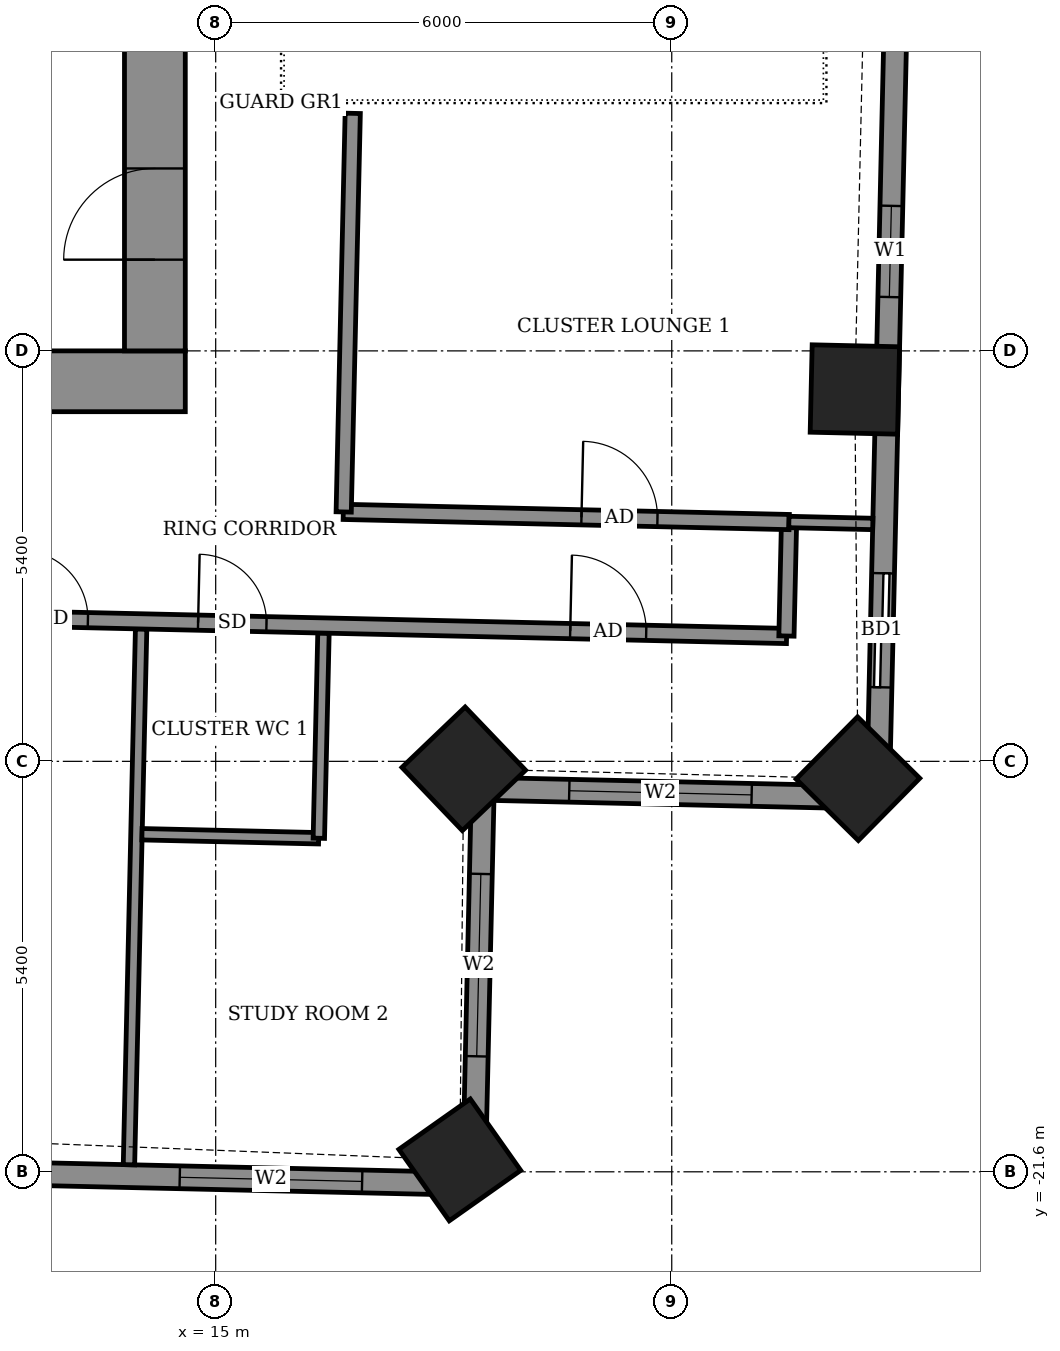
"""IFC4 building model, lengths in metres.
Left out: names, types, materials, properties, quantities, classifications, styles, units other than length and angle.
Written with IfcOpenShell. Run it as: python <this file> out.ifc"""

import sys

from ifc_helpers import new_model, si_unit, direction, frame, frame_2d, origin, origin_2d, place, context, subcontext, project, spatial, rectangle, extrude, element, fill, save


model = new_model("IFC4")
c1 = context("Model", 3, precision=1e-05, world=origin(), true_north=direction((0.0, 1.0)))
c2 = subcontext(c1, "Body", "Model", "MODEL_VIEW")
j1 = project(units=[si_unit("LENGTHUNIT", "METRE"), si_unit("PLANEANGLEUNIT", "RADIAN")], contexts=[c1])
p1 = place(None, origin())
s1 = spatial("IfcSite", under=j1, at=p1, CompositionType="ELEMENT")
p2 = place(p1, origin())
s2 = spatial("IfcBuilding", under=s1, at=p2, CompositionType="ELEMENT")
p3 = place(p2, frame((0.0, 0.0, 205.1)))
s3 = spatial("IfcBuildingStorey", under=s2, at=p3, CompositionType="ELEMENT", Elevation=205.1)
for number, where, z_axis, x_axis in (
    (1, (18.211, -21.443, -0.55), (0.0, 0.0, 1.0), (0.817, 0.577, 0.0)),
    (2, (18.264, -16.298, -0.55), (0.0, 0.0, 1.0), (0.723, 0.691, 0.0)),
    (3, (23.45, -16.428, -0.55), (0.0, 0.0, 1.0), (0.702, 0.712, 0.0)),
    (4, (23.409, -11.308, -0.55), (0.0, 0.0, 1.0), (0.023, 1.0, 0.0)),
):
    element("IfcColumn", number, at=place(p3, frame(where, z_axis=z_axis, x_axis=x_axis)), inside=s3, PredefinedType="COLUMN", context=c2, shape_type="SweptSolid", body=[
        extrude(rectangle(XDim=1.15, YDim=1.15, at=origin_2d()), origin(), (0.0, 0.0, 1.0), 3.6),
    ])
p4 = place(p3, frame((23.713, -16.679, 0.0), z_axis=(0.0, 0.0, 1.0), x_axis=(0.022674801414, 0.999742893639, 0.0)))
e5 = element("IfcWall", 5, at=p4, inside=s3, PredefinedType="SOLIDWALL", context=c2, shape_type="SweptSolid", body=[
    extrude(rectangle(XDim=11.424, YDim=0.3, at=frame_2d((5.712, 0.0))), origin(), (0.0, 0.0, 1.0), 2.55),
])
p5 = place(p4, frame((1.454, 0.0, 0.0)))
e6 = element("IfcOpeningElement", 6, at=p5, cuts=e5, PredefinedType="OPENING", context=c2, shape_type="SweptSolid", body=[
    extrude(rectangle(XDim=1.5, YDim=2.4, at=frame_2d((0.75, 1.2))), frame((0.0, 0.16, 0.0), z_axis=(0.0, -1.0, 0.0), x_axis=(1.0, 0.0, 0.0)), (0.0, 0.0, 1.0), 0.32),
])
p6 = place(p4, frame((6.589, 0.0, 0.9)))
e7 = element("IfcOpeningElement", 7, at=p6, cuts=e5, PredefinedType="OPENING", context=c2, shape_type="SweptSolid", body=[
    extrude(rectangle(XDim=1.2, YDim=1.5, at=frame_2d((0.6, 0.75))), frame((0.0, 0.16, 0.0), z_axis=(0.0, -1.0, 0.0), x_axis=(1.0, 0.0, 0.0)), (0.0, 0.0, 1.0), 0.32),
])
p7 = place(p3, frame((-23.437, -20.81, 0.0), z_axis=(0.0, 0.0, 1.0), x_axis=(0.999742269115, -0.022702320244, 0.0)))
e8 = element("IfcWall", 8, at=p7, inside=s3, PredefinedType="SOLIDWALL", context=c2, shape_type="SweptSolid", body=[
    extrude(rectangle(XDim=41.844, YDim=0.3, at=frame_2d((20.922, 0.0))), origin(), (0.0, 0.0, 1.0), 2.55),
])
p8 = place(p7, frame((1.899, 0.0, 0.0)))
e9 = element("IfcOpeningElement", 9, at=p8, cuts=e8, PredefinedType="OPENING", context=c2, shape_type="SweptSolid", body=[
    extrude(rectangle(XDim=1.5, YDim=2.4, at=frame_2d((0.75, 1.2))), frame((0.0, 0.16, 0.0), z_axis=(0.0, -1.0, 0.0), x_axis=(1.0, 0.0, 0.0)), (0.0, 0.0, 1.0), 0.32),
])
p9 = place(p7, frame((7.575, 0.0, 0.0)))
e10 = element("IfcOpeningElement", 10, at=p9, cuts=e8, PredefinedType="OPENING", context=c2, shape_type="SweptSolid", body=[
    extrude(rectangle(XDim=1.2, YDim=2.4, at=frame_2d((0.6, 1.2))), frame((0.0, 0.16, 0.0), z_axis=(0.0, -1.0, 0.0), x_axis=(1.0, 0.0, 0.0)), (0.0, 0.0, 1.0), 0.32),
])
p10 = place(p7, frame((10.612, 0.0, 0.0)))
e11 = element("IfcOpeningElement", 11, at=p10, cuts=e8, PredefinedType="OPENING", context=c2, shape_type="SweptSolid", body=[
    extrude(rectangle(XDim=1.5, YDim=2.4, at=frame_2d((0.75, 1.2))), frame((0.0, 0.16, 0.0), z_axis=(0.0, -1.0, 0.0), x_axis=(1.0, 0.0, 0.0)), (0.0, 0.0, 1.0), 0.32),
])
p11 = place(p7, frame((15.762, 0.0, 0.0)))
e12 = element("IfcOpeningElement", 12, at=p11, cuts=e8, PredefinedType="OPENING", context=c2, shape_type="SweptSolid", body=[
    extrude(rectangle(XDim=1.5, YDim=2.4, at=frame_2d((0.75, 1.2))), frame((0.0, 0.16, 0.0), z_axis=(0.0, -1.0, 0.0), x_axis=(1.0, 0.0, 0.0)), (0.0, 0.0, 1.0), 0.32),
])
p12 = place(p7, frame((21.648, 0.0, 0.0)))
e13 = element("IfcOpeningElement", 13, at=p12, cuts=e8, PredefinedType="OPENING", context=c2, shape_type="SweptSolid", body=[
    extrude(rectangle(XDim=1.2, YDim=2.4, at=frame_2d((0.6, 1.2))), frame((0.0, 0.16, 0.0), z_axis=(0.0, -1.0, 0.0), x_axis=(1.0, 0.0, 0.0)), (0.0, 0.0, 1.0), 0.32),
])
p13 = place(p7, frame((24.685, 0.0, 0.0)))
e14 = element("IfcOpeningElement", 14, at=p13, cuts=e8, PredefinedType="OPENING", context=c2, shape_type="SweptSolid", body=[
    extrude(rectangle(XDim=1.5, YDim=2.4, at=frame_2d((0.75, 1.2))), frame((0.0, 0.16, 0.0), z_axis=(0.0, -1.0, 0.0), x_axis=(1.0, 0.0, 0.0)), (0.0, 0.0, 1.0), 0.32),
])
p14 = place(p7, frame((29.685, 0.0, 0.0)))
e15 = element("IfcOpeningElement", 15, at=p14, cuts=e8, PredefinedType="OPENING", context=c2, shape_type="SweptSolid", body=[
    extrude(rectangle(XDim=1.5, YDim=2.4, at=frame_2d((0.75, 1.2))), frame((0.0, 0.16, 0.0), z_axis=(0.0, -1.0, 0.0), x_axis=(1.0, 0.0, 0.0)), (0.0, 0.0, 1.0), 0.32),
])
p15 = place(p7, frame((33.022, 0.0, 0.0)))
e16 = element("IfcOpeningElement", 16, at=p15, cuts=e8, PredefinedType="OPENING", context=c2, shape_type="SweptSolid", body=[
    extrude(rectangle(XDim=1.2, YDim=2.4, at=frame_2d((0.6, 1.2))), frame((0.0, 0.16, 0.0), z_axis=(0.0, -1.0, 0.0), x_axis=(1.0, 0.0, 0.0)), (0.0, 0.0, 1.0), 0.32),
])
p16 = place(p7, frame((37.974, 0.0, 0.9)))
e17 = element("IfcOpeningElement", 17, at=p16, cuts=e8, PredefinedType="OPENING", context=c2, shape_type="SweptSolid", body=[
    extrude(rectangle(XDim=2.4, YDim=1.5, at=frame_2d((1.2, 0.75))), frame((0.0, 0.16, 0.0), z_axis=(0.0, -1.0, 0.0), x_axis=(1.0, 0.0, 0.0)), (0.0, 0.0, 1.0), 0.32),
])
p17 = place(p3, frame((18.396, -21.76, 0.0), z_axis=(0.0, 0.0, 1.0), x_axis=(0.022675548694, 0.99974287669, 0.0)))
e18 = element("IfcWall", 18, at=p17, inside=s3, PredefinedType="SOLIDWALL", context=c2, shape_type="SweptSolid", body=[
    extrude(rectangle(XDim=5.2, YDim=0.3, at=frame_2d((2.6, 0.0))), origin(), (0.0, 0.0, 1.0), 2.55),
])
p18 = place(p17, frame((1.68, 0.0, 0.9)))
e19 = element("IfcOpeningElement", 19, at=p18, cuts=e18, PredefinedType="OPENING", context=c2, shape_type="SweptSolid", body=[
    extrude(rectangle(XDim=2.4, YDim=1.5, at=frame_2d((1.2, 0.75))), frame((0.0, 0.16, 0.0), z_axis=(0.0, -1.0, 0.0), x_axis=(1.0, 0.0, 0.0)), (0.0, 0.0, 1.0), 0.32),
])
p19 = place(p3, frame((18.514, -16.561, 0.0), z_axis=(0.0, 0.0, 1.0), x_axis=(0.99974287669, -0.022675548694, 0.0)))
e20 = element("IfcWall", 20, at=p19, inside=s3, PredefinedType="SOLIDWALL", context=c2, shape_type="SweptSolid", body=[
    extrude(rectangle(XDim=5.2, YDim=0.3, at=frame_2d((2.6, 0.0))), origin(), (0.0, 0.0, 1.0), 2.55),
])
p20 = place(p19, frame((1.138, 0.0, 0.9)))
e21 = element("IfcOpeningElement", 21, at=p20, cuts=e20, PredefinedType="OPENING", context=c2, shape_type="SweptSolid", body=[
    extrude(rectangle(XDim=2.4, YDim=1.5, at=frame_2d((1.2, 0.75))), frame((0.0, 0.16, 0.0), z_axis=(0.0, -1.0, 0.0), x_axis=(1.0, 0.0, 0.0)), (0.0, 0.0, 1.0), 0.32),
])
p21 = place(p3, frame((13.859, -21.507, 0.0), z_axis=(0.0, 0.0, 1.0), x_axis=(0.022714326521, 0.999741996402, 0.0)))
e22 = element("IfcWall", 22, at=p21, inside=s3, PredefinedType="PARTITIONING", context=c2, shape_type="SweptSolid", body=[
    extrude(rectangle(XDim=7.051, YDim=0.15, at=frame_2d((3.525, 0.0))), origin(), (0.0, 0.0, 1.0), 2.55),
])
p22 = place(p3, frame((14.03, -17.159, 0.0), z_axis=(0.0, 0.0, 1.0), x_axis=(0.999740478815, -0.022781023197, 0.0)))
e23 = element("IfcWall", 23, at=p22, inside=s3, PredefinedType="PARTITIONING", context=c2, shape_type="SweptSolid", body=[
    extrude(rectangle(XDim=2.325, YDim=0.15, at=frame_2d((1.163, 0.0))), origin(), (0.0, 0.0, 1.0), 3.05),
])
p23 = place(p3, frame((16.357, -17.212, 0.0), z_axis=(0.0, 0.0, 1.0), x_axis=(0.02260842146, 0.999744396973, 0.0)))
e24 = element("IfcWall", 24, at=p23, inside=s3, PredefinedType="PARTITIONING", context=c2, shape_type="SweptSolid", body=[
    extrude(rectangle(XDim=2.7, YDim=0.15, at=frame_2d((1.35, 0.0))), origin(), (0.0, 0.0, 1.0), 3.05),
])
p24 = place(p3, frame((-26.421, -13.441, 0.0), z_axis=(0.0, 0.0, 1.0), x_axis=(0.999742754064, -0.022680954485, 0.0)))
e25 = element("IfcWall", 25, at=p24, inside=s3, PredefinedType="PARTITIONING", context=c2, shape_type="SweptSolid", body=[
    extrude(rectangle(XDim=48.945, YDim=0.2, at=frame_2d((24.472, 0.0))), origin(), (0.0, 0.0, 1.0), 3.05),
])
p25 = place(p24, frame((1.375, 0.0, 0.0)))
e26 = element("IfcOpeningElement", 26, at=p25, cuts=e25, PredefinedType="OPENING", context=c2, shape_type="SweptSolid", body=[
    extrude(rectangle(XDim=1.0, YDim=2.1, at=frame_2d((0.5, 1.05))), frame((0.0, 0.11, 0.0), z_axis=(0.0, -1.0, 0.0), x_axis=(1.0, 0.0, 0.0)), (0.0, 0.0, 1.0), 0.22),
])
p26 = place(p24, frame((6.0, 0.0, 0.0)))
e27 = element("IfcOpeningElement", 27, at=p26, cuts=e25, PredefinedType="OPENING", context=c2, shape_type="SweptSolid", body=[
    extrude(rectangle(XDim=0.9, YDim=2.1, at=frame_2d((0.45, 1.05))), frame((0.0, 0.11, 0.0), z_axis=(0.0, -1.0, 0.0), x_axis=(1.0, 0.0, 0.0)), (0.0, 0.0, 1.0), 0.22),
])
p27 = place(p24, frame((10.775, 0.0, 0.0)))
e28 = element("IfcOpeningElement", 28, at=p27, cuts=e25, PredefinedType="OPENING", context=c2, shape_type="SweptSolid", body=[
    extrude(rectangle(XDim=0.9, YDim=2.1, at=frame_2d((0.45, 1.05))), frame((0.0, 0.11, 0.0), z_axis=(0.0, -1.0, 0.0), x_axis=(1.0, 0.0, 0.0)), (0.0, 0.0, 1.0), 0.22),
])
p28 = place(p24, frame((13.05, 0.0, 0.0)))
e29 = element("IfcOpeningElement", 29, at=p28, cuts=e25, PredefinedType="OPENING", context=c2, shape_type="SweptSolid", body=[
    extrude(rectangle(XDim=0.9, YDim=2.1, at=frame_2d((0.45, 1.05))), frame((0.0, 0.11, 0.0), z_axis=(0.0, -1.0, 0.0), x_axis=(1.0, 0.0, 0.0)), (0.0, 0.0, 1.0), 0.22),
])
p29 = place(p24, frame((20.275, 0.0, 0.0)))
e30 = element("IfcOpeningElement", 30, at=p29, cuts=e25, PredefinedType="OPENING", context=c2, shape_type="SweptSolid", body=[
    extrude(rectangle(XDim=0.9, YDim=2.1, at=frame_2d((0.45, 1.05))), frame((0.0, 0.11, 0.0), z_axis=(0.0, -1.0, 0.0), x_axis=(1.0, 0.0, 0.0)), (0.0, 0.0, 1.0), 0.22),
])
p30 = place(p24, frame((22.525, 0.0, 0.0)))
e31 = element("IfcOpeningElement", 31, at=p30, cuts=e25, PredefinedType="OPENING", context=c2, shape_type="SweptSolid", body=[
    extrude(rectangle(XDim=0.9, YDim=2.1, at=frame_2d((0.45, 1.05))), frame((0.0, 0.11, 0.0), z_axis=(0.0, -1.0, 0.0), x_axis=(1.0, 0.0, 0.0)), (0.0, 0.0, 1.0), 0.22),
])
p31 = place(p24, frame((29.6, 0.0, 0.0)))
e32 = element("IfcOpeningElement", 32, at=p31, cuts=e25, PredefinedType="OPENING", context=c2, shape_type="SweptSolid", body=[
    extrude(rectangle(XDim=0.9, YDim=2.1, at=frame_2d((0.45, 1.05))), frame((0.0, 0.11, 0.0), z_axis=(0.0, -1.0, 0.0), x_axis=(1.0, 0.0, 0.0)), (0.0, 0.0, 1.0), 0.22),
])
p32 = place(p24, frame((31.875, 0.0, 0.0)))
e33 = element("IfcOpeningElement", 33, at=p32, cuts=e25, PredefinedType="OPENING", context=c2, shape_type="SweptSolid", body=[
    extrude(rectangle(XDim=0.9, YDim=2.1, at=frame_2d((0.45, 1.05))), frame((0.0, 0.11, 0.0), z_axis=(0.0, -1.0, 0.0), x_axis=(1.0, 0.0, 0.0)), (0.0, 0.0, 1.0), 0.22),
])
p33 = place(p24, frame((38.85, 0.0, 0.0)))
e34 = element("IfcOpeningElement", 34, at=p33, cuts=e25, PredefinedType="OPENING", context=c2, shape_type="SweptSolid", body=[
    extrude(rectangle(XDim=0.9, YDim=2.1, at=frame_2d((0.45, 1.05))), frame((0.0, 0.11, 0.0), z_axis=(0.0, -1.0, 0.0), x_axis=(1.0, 0.0, 0.0)), (0.0, 0.0, 1.0), 0.22),
])
p34 = place(p24, frame((46.097, 0.0, 0.0)))
e35 = element("IfcOpeningElement", 35, at=p34, cuts=e25, PredefinedType="OPENING", context=c2, shape_type="SweptSolid", body=[
    extrude(rectangle(XDim=1.0, YDim=2.1, at=frame_2d((0.5, 1.05))), frame((0.0, 0.11, 0.0), z_axis=(0.0, -1.0, 0.0), x_axis=(1.0, 0.0, 0.0)), (0.0, 0.0, 1.0), 0.22),
])
p35 = place(p24, frame((41.2, 0.0, 0.0)))
e36 = element("IfcOpeningElement", 36, at=p35, cuts=e25, PredefinedType="OPENING", context=c2, shape_type="SweptSolid", body=[
    extrude(rectangle(XDim=0.9, YDim=2.1, at=frame_2d((0.45, 1.05))), frame((0.0, 0.11, 0.0), z_axis=(0.0, -1.0, 0.0), x_axis=(1.0, 0.0, 0.0)), (0.0, 0.0, 1.0), 0.22),
])
p36 = place(p3, frame((22.509, -14.551, 0.0), z_axis=(0.0, 0.0, 1.0), x_axis=(0.022632637625, 0.99974384905, 0.0)))
e37 = element("IfcWall", 37, at=p36, inside=s3, PredefinedType="PARTITIONING", context=c2, shape_type="SweptSolid", body=[
    extrude(rectangle(XDim=1.5, YDim=0.2, at=frame_2d((0.75, 0.0))), origin(), (0.0, 0.0, 1.0), 3.05),
])
p37 = place(p3, frame((16.679, -12.918, 0.0), z_axis=(0.0, 0.0, 1.0), x_axis=(0.999739057042, -0.022843332181, 0.0)))
e38 = element("IfcWall", 38, at=p37, inside=s3, PredefinedType="PARTITIONING", context=c2, shape_type="SweptSolid", body=[
    extrude(rectangle(XDim=5.867, YDim=0.2, at=frame_2d((2.934, 0.0))), origin(), (0.0, 0.0, 1.0), 3.05),
])
p38 = place(p37, frame((3.134, 0.0, 0.0)))
e39 = element("IfcOpeningElement", 39, at=p38, cuts=e38, PredefinedType="OPENING", context=c2, shape_type="SweptSolid", body=[
    extrude(rectangle(XDim=1.0, YDim=2.1, at=frame_2d((0.5, 1.05))), frame((0.0, 0.11, 0.0), z_axis=(0.0, -1.0, 0.0), x_axis=(1.0, 0.0, 0.0)), (0.0, 0.0, 1.0), 0.22),
])
p39 = place(p3, frame((16.684, -12.919, 0.0), z_axis=(0.0, 0.0, 1.0), x_axis=(0.022667483124, 0.999743059595, 0.0)))
e40 = element("IfcWall", 40, at=p39, inside=s3, PredefinedType="PARTITIONING", context=c2, shape_type="SweptSolid", body=[
    extrude(rectangle(XDim=5.245, YDim=0.2, at=frame_2d((2.623, 0.0))), origin(), (0.0, 0.0, 1.0), 3.05),
])
p40 = place(p3, frame((22.541, -13.051, 0.0), z_axis=(0.0, 0.0, 1.0), x_axis=(0.999725373977, -0.023434517833, 0.0)))
e41 = element("IfcWall", 41, at=p40, inside=s3, PredefinedType="PARTITIONING", context=c2, shape_type="SweptSolid", body=[
    extrude(rectangle(XDim=1.104, YDim=0.15, at=frame_2d((0.552, 0.0))), origin(), (0.0, 0.0, 1.0), 2.55),
])
p41 = place(p3, frame((-14.6, -11.2, 0.0), z_axis=(0.0, 0.0, 1.0), x_axis=(1.0, 0.0, 0.0)))
e42 = element("IfcWall", 42, at=p41, inside=s3, PredefinedType="SHEAR", context=c2, shape_type="SweptSolid", body=[
    extrude(rectangle(XDim=29.2, YDim=0.8, at=frame_2d((14.6, 0.0))), origin(), (0.0, 0.0, 1.0), 3.6),
])
p42 = place(p3, frame((14.2, -10.8, 0.0), z_axis=(0.0, 0.0, 1.0), x_axis=(0.0, 1.0, 0.0)))
e43 = element("IfcWall", 43, at=p42, inside=s3, PredefinedType="SHEAR", context=c2, shape_type="SweptSolid", body=[
    extrude(rectangle(XDim=21.6, YDim=0.8, at=frame_2d((10.8, 0.0))), origin(), (0.0, 0.0, 1.0), 3.6),
])
p43 = place(p42, frame((1.2, 0.0, 0.0)))
e44 = element("IfcOpeningElement", 44, at=p43, cuts=e43, PredefinedType="OPENING", context=c2, shape_type="SweptSolid", body=[
    extrude(rectangle(XDim=1.2, YDim=2.1, at=frame_2d((0.6, 1.05))), frame((0.0, 0.41, 0.0), z_axis=(0.0, -1.0, 0.0), x_axis=(1.0, 0.0, 0.0)), (0.0, 0.0, 1.0), 0.82),
])
p44 = place(p5, origin())
e45 = element("IfcDoor", 45, at=p44, inside=s3, OperationType="SLIDING_TO_LEFT", PredefinedType="DOOR", context=c2, shape_type="SweptSolid", body=[
    extrude(rectangle(XDim=1.5, YDim=2.4, at=frame_2d((0.75, 1.2))), frame((0.0, 0.025, 0.0), z_axis=(0.0, -1.0, 0.0), x_axis=(1.0, 0.0, 0.0)), (0.0, 0.0, 1.0), 0.05),
])
fill(e6, e45)
p45 = place(p6, origin())
e46 = element("IfcWindow", 46, at=p45, inside=s3, PartitioningType="SINGLE_PANEL", PredefinedType="WINDOW", context=c2, shape_type="SweptSolid", body=[
    extrude(rectangle(XDim=1.2, YDim=1.5, at=frame_2d((0.6, 0.75))), frame((0.0, 0.03, 0.0), z_axis=(0.0, -1.0, 0.0), x_axis=(1.0, 0.0, 0.0)), (0.0, 0.0, 1.0), 0.06),
])
fill(e7, e46)
p46 = place(p16, origin())
e47 = element("IfcWindow", 47, at=p46, inside=s3, PartitioningType="DOUBLE_PANEL_VERTICAL", PredefinedType="WINDOW", context=c2, shape_type="SweptSolid", body=[
    extrude(rectangle(XDim=2.4, YDim=1.5, at=frame_2d((1.2, 0.75))), frame((0.0, 0.03, 0.0), z_axis=(0.0, -1.0, 0.0), x_axis=(1.0, 0.0, 0.0)), (0.0, 0.0, 1.0), 0.06),
])
fill(e17, e47)
p47 = place(p18, origin())
e48 = element("IfcWindow", 48, at=p47, inside=s3, PartitioningType="DOUBLE_PANEL_VERTICAL", PredefinedType="WINDOW", context=c2, shape_type="SweptSolid", body=[
    extrude(rectangle(XDim=2.4, YDim=1.5, at=frame_2d((1.2, 0.75))), frame((0.0, 0.03, 0.0), z_axis=(0.0, -1.0, 0.0), x_axis=(1.0, 0.0, 0.0)), (0.0, 0.0, 1.0), 0.06),
])
fill(e19, e48)
p48 = place(p20, origin())
e49 = element("IfcWindow", 49, at=p48, inside=s3, PartitioningType="DOUBLE_PANEL_VERTICAL", PredefinedType="WINDOW", context=c2, shape_type="SweptSolid", body=[
    extrude(rectangle(XDim=2.4, YDim=1.5, at=frame_2d((1.2, 0.75))), frame((0.0, 0.03, 0.0), z_axis=(0.0, -1.0, 0.0), x_axis=(1.0, 0.0, 0.0)), (0.0, 0.0, 1.0), 0.06),
])
fill(e21, e49)
p49 = place(p33, origin())
e50 = element("IfcDoor", 50, at=p49, inside=s3, OperationType="SINGLE_SWING_LEFT", PredefinedType="DOOR", context=c2, shape_type="SweptSolid", body=[
    extrude(rectangle(XDim=0.9, YDim=2.1, at=frame_2d((0.45, 1.05))), frame((0.0, 0.025, 0.0), z_axis=(0.0, -1.0, 0.0), x_axis=(1.0, 0.0, 0.0)), (0.0, 0.0, 1.0), 0.05),
])
fill(e34, e50)
p50 = place(p34, origin())
e51 = element("IfcDoor", 51, at=p50, inside=s3, OperationType="SINGLE_SWING_RIGHT", PredefinedType="DOOR", context=c2, shape_type="SweptSolid", body=[
    extrude(rectangle(XDim=1.0, YDim=2.1, at=frame_2d((0.5, 1.05))), frame((0.0, 0.025, 0.0), z_axis=(0.0, -1.0, 0.0), x_axis=(1.0, 0.0, 0.0)), (0.0, 0.0, 1.0), 0.05),
])
fill(e35, e51)
p51 = place(p35, origin())
e52 = element("IfcDoor", 52, at=p51, inside=s3, OperationType="SINGLE_SWING_RIGHT", PredefinedType="DOOR", context=c2, shape_type="SweptSolid", body=[
    extrude(rectangle(XDim=0.9, YDim=2.1, at=frame_2d((0.45, 1.05))), frame((0.0, 0.025, 0.0), z_axis=(0.0, -1.0, 0.0), x_axis=(1.0, 0.0, 0.0)), (0.0, 0.0, 1.0), 0.05),
])
fill(e36, e52)
p52 = place(p38, origin())
e53 = element("IfcDoor", 53, at=p52, inside=s3, OperationType="SINGLE_SWING_LEFT", PredefinedType="DOOR", context=c2, shape_type="SweptSolid", body=[
    extrude(rectangle(XDim=1.0, YDim=2.1, at=frame_2d((0.5, 1.05))), frame((0.0, 0.025, 0.0), z_axis=(0.0, -1.0, 0.0), x_axis=(1.0, 0.0, 0.0)), (0.0, 0.0, 1.0), 0.05),
])
fill(e39, e53)
p53 = place(p43, origin())
e54 = element("IfcDoor", 54, at=p53, inside=s3, OperationType="DOUBLE_DOOR_SINGLE_SWING", PredefinedType="DOOR", context=c2, shape_type="SweptSolid", body=[
    extrude(rectangle(XDim=1.2, YDim=2.1, at=frame_2d((0.6, 1.05))), frame((0.0, 0.025, 0.0), z_axis=(0.0, -1.0, 0.0), x_axis=(1.0, 0.0, 0.0)), (0.0, 0.0, 1.0), 0.05),
])
fill(e44, e54)
save(model, sys.argv[1])
